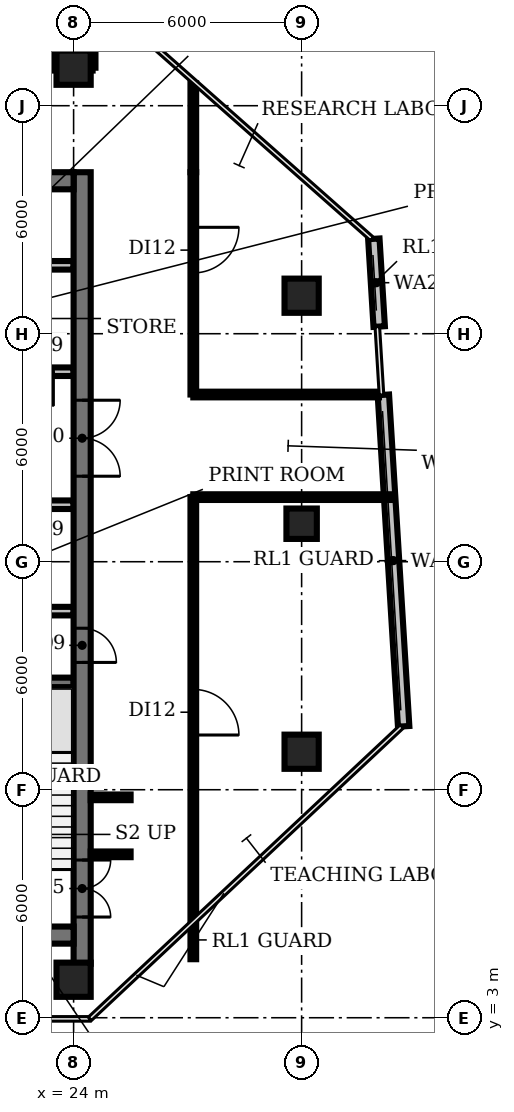
"""IFC4 building model, lengths in metres.
Left out: names, types, materials, properties, quantities, classifications, styles, units other than length and angle.
Written with IfcOpenShell. Run it as: python <this file> out.ifc"""

import sys

from ifc_helpers import new_model, si_unit, direction, frame, frame_2d, origin, origin_2d, place, context, subcontext, project, spatial, rectangle, circle, extrude, element, fill, save


model = new_model("IFC4")
c1 = context("Model", 3, precision=1e-05, world=origin(), true_north=direction((0.0, 1.0)))
c2 = subcontext(c1, "Body", "Model", "MODEL_VIEW")
j1 = project(units=[si_unit("LENGTHUNIT", "METRE"), si_unit("PLANEANGLEUNIT", "RADIAN")], contexts=[c1])
p1 = place(None, origin())
s1 = spatial("IfcSite", under=j1, at=p1, CompositionType="ELEMENT")
p2 = place(p1, origin())
s2 = spatial("IfcBuilding", under=s1, at=p2, CompositionType="ELEMENT")
p3 = place(p2, frame((0.0, 0.0, 213.8)))
s3 = spatial("IfcBuildingStorey", under=s2, at=p3, CompositionType="ELEMENT", Elevation=213.8)
for number, where, z_axis, x_axis in (
    (1, (24.0, 4.0, 0.0), (0.0, 0.0, 1.0), (1.0, 0.0, 0.0)),
    (2, (24.0, 28.0, 0.0), (0.0, 0.0, 1.0), (1.0, 0.0, 0.0)),
    (3, (30.0, 10.0, 0.0), (0.0, 0.0, 1.0), (1.0, 0.0, 0.0)),
):
    element("IfcColumn", number, at=place(p3, frame(where, z_axis=z_axis, x_axis=x_axis)), inside=s3, PredefinedType="COLUMN", context=c2, shape_type="SweptSolid", body=[
        extrude(circle(Radius=0.45, at=origin_2d()), origin(), (0.0, 0.0, 1.0), 3.85),
    ])
p4 = place(p3, frame((30.0, 16.0, 0.0), z_axis=(0.0, 0.0, 1.0), x_axis=(1.0, 0.0, 0.0)))
e4 = element("IfcColumn", 4, at=p4, inside=s3, PredefinedType="COLUMN", context=c2, shape_type="SweptSolid", body=[
    extrude(rectangle(XDim=0.8, YDim=0.8, at=origin_2d()), origin(), (0.0, 0.0, 1.0), 3.85),
])
p5 = place(p3, frame((30.0, 22.0, 0.0), z_axis=(0.0, 0.0, 1.0), x_axis=(1.0, 0.0, 0.0)))
e5 = element("IfcColumn", 5, at=p5, inside=s3, PredefinedType="COLUMN", context=c2, shape_type="SweptSolid", body=[
    extrude(circle(Radius=0.45, at=origin_2d()), origin(), (0.0, 0.0, 1.0), 3.85),
])
p6 = place(p3, frame((32.685, 10.668, 0.0), z_axis=(0.0, 0.0, 1.0), x_axis=(-0.061063491269, 0.998133883822, 0.0)))
e6 = element("IfcWall", 6, at=p6, inside=s3, PredefinedType="SOLIDWALL", context=c2, shape_type="SweptSolid", body=[
    extrude(rectangle(XDim=8.74, YDim=0.3, at=frame_2d((4.37, 0.0))), origin(), (0.0, 0.0, 1.0), 3.85),
])
p7 = place(p3, frame((32.041, 21.188, 0.0), z_axis=(0.0, 0.0, 1.0), x_axis=(-0.060998486175, 0.998137858557, 0.0)))
e7 = element("IfcWall", 7, at=p7, inside=s3, PredefinedType="SOLIDWALL", context=c2, shape_type="SweptSolid", body=[
    extrude(rectangle(XDim=2.313, YDim=0.3, at=frame_2d((1.157, 0.0))), origin(), (0.0, 0.0, 1.0), 3.85),
])
p8 = place(p3, frame((20.85, 11.825, 0.0), z_axis=(0.0, 0.0, 1.0), x_axis=(1.0, 0.0, 0.0)))
e8 = element("IfcWall", 8, at=p8, inside=s3, PredefinedType="SHEAR", context=c2, shape_type="SweptSolid", body=[
    extrude(rectangle(XDim=3.15, YDim=0.25, at=frame_2d((1.575, 0.0))), origin(), (0.0, 0.0, 1.0), 3.85),
])
p9 = place(p3, frame((16.6, 13.7, 0.0), z_axis=(0.0, 0.0, 1.0), x_axis=(1.0, 0.0, 0.0)))
e9 = element("IfcWall", 9, at=p9, inside=s3, PredefinedType="PARTITIONING", context=c2, shape_type="SweptSolid", body=[
    extrude(rectangle(XDim=7.4, YDim=0.225, at=frame_2d((3.7, 0.0))), origin(), (0.0, 0.0, 1.0), 3.85),
])
p10 = place(p3, frame((9.4, 16.5, 0.0), z_axis=(0.0, 0.0, 1.0), x_axis=(1.0, 0.0, 0.0)))
e10 = element("IfcWall", 10, at=p10, inside=s3, PredefinedType="PARTITIONING", context=c2, shape_type="SweptSolid", body=[
    extrude(rectangle(XDim=14.6, YDim=0.225, at=frame_2d((7.3, 0.0))), origin(), (0.0, 0.0, 1.0), 3.85),
])
p11 = place(p10, frame((0.55, 0.0, 0.0)))
e11 = element("IfcOpeningElement", 11, at=p11, cuts=e10, PredefinedType="OPENING", context=c2, shape_type="SweptSolid", body=[
    extrude(rectangle(XDim=0.9, YDim=2.1, at=frame_2d((0.45, 1.05))), frame((0.0, 0.123, 0.0), z_axis=(0.0, -1.0, 0.0), x_axis=(1.0, 0.0, 0.0)), (0.0, 0.0, 1.0), 0.245),
])
p12 = place(p10, frame((6.075, 0.0, 0.0)))
e12 = element("IfcOpeningElement", 12, at=p12, cuts=e10, PredefinedType="OPENING", context=c2, shape_type="SweptSolid", body=[
    extrude(rectangle(XDim=1.0, YDim=2.1, at=frame_2d((0.5, 1.05))), frame((0.0, 0.123, 0.0), z_axis=(0.0, -1.0, 0.0), x_axis=(1.0, 0.0, 0.0)), (0.0, 0.0, 1.0), 0.245),
])
p13 = place(p10, frame((11.308, 0.0, 0.0)))
e13 = element("IfcOpeningElement", 13, at=p13, cuts=e10, PredefinedType="OPENING", context=c2, shape_type="SweptSolid", body=[
    extrude(rectangle(XDim=0.9, YDim=2.1, at=frame_2d((0.45, 1.05))), frame((0.0, 0.123, 0.0), z_axis=(0.0, -1.0, 0.0), x_axis=(1.0, 0.0, 0.0)), (0.0, 0.0, 1.0), 0.245),
])
p14 = place(p10, frame((13.083, 0.0, 0.0)))
e14 = element("IfcOpeningElement", 14, at=p14, cuts=e10, PredefinedType="OPENING", context=c2, shape_type="SweptSolid", body=[
    extrude(rectangle(XDim=0.9, YDim=2.1, at=frame_2d((0.45, 1.05))), frame((0.0, 0.123, 0.0), z_axis=(0.0, -1.0, 0.0), x_axis=(1.0, 0.0, 0.0)), (0.0, 0.0, 1.0), 0.245),
])
p15 = place(p3, frame((24.0, 20.0, 0.0), z_axis=(0.0, 0.0, 1.0), x_axis=(-1.0, 0.0, 0.0)))
e15 = element("IfcWall", 15, at=p15, inside=s3, PredefinedType="PARTITIONING", context=c2, shape_type="SweptSolid", body=[
    extrude(rectangle(XDim=14.6, YDim=0.225, at=frame_2d((7.3, 0.0))), origin(), (0.0, 0.0, 1.0), 3.85),
])
p16 = place(p15, frame((12.75, 0.0, 0.0)))
e16 = element("IfcOpeningElement", 16, at=p16, cuts=e15, PredefinedType="OPENING", context=c2, shape_type="SweptSolid", body=[
    extrude(rectangle(XDim=1.1, YDim=2.1, at=frame_2d((0.55, 1.05))), frame((0.0, 0.123, 0.0), z_axis=(0.0, -1.0, 0.0), x_axis=(1.0, 0.0, 0.0)), (0.0, 0.0, 1.0), 0.245),
])
p17 = place(p15, frame((9.95, 0.0, 0.0)))
e17 = element("IfcOpeningElement", 17, at=p17, cuts=e15, PredefinedType="OPENING", context=c2, shape_type="SweptSolid", body=[
    extrude(rectangle(XDim=1.1, YDim=2.1, at=frame_2d((0.55, 1.05))), frame((0.0, 0.123, 0.0), z_axis=(0.0, -1.0, 0.0), x_axis=(1.0, 0.0, 0.0)), (0.0, 0.0, 1.0), 0.245),
])
p18 = place(p15, frame((7.15, 0.0, 0.0)))
e18 = element("IfcOpeningElement", 18, at=p18, cuts=e15, PredefinedType="OPENING", context=c2, shape_type="SweptSolid", body=[
    extrude(rectangle(XDim=1.1, YDim=2.1, at=frame_2d((0.55, 1.05))), frame((0.0, 0.123, 0.0), z_axis=(0.0, -1.0, 0.0), x_axis=(1.0, 0.0, 0.0)), (0.0, 0.0, 1.0), 0.245),
])
p19 = place(p15, frame((4.35, 0.0, 0.0)))
e19 = element("IfcOpeningElement", 19, at=p19, cuts=e15, PredefinedType="OPENING", context=c2, shape_type="SweptSolid", body=[
    extrude(rectangle(XDim=1.1, YDim=2.1, at=frame_2d((0.55, 1.05))), frame((0.0, 0.123, 0.0), z_axis=(0.0, -1.0, 0.0), x_axis=(1.0, 0.0, 0.0)), (0.0, 0.0, 1.0), 0.245),
])
p20 = place(p15, frame((2.308, 0.0, 0.0)))
e20 = element("IfcOpeningElement", 20, at=p20, cuts=e15, PredefinedType="OPENING", context=c2, shape_type="SweptSolid", body=[
    extrude(rectangle(XDim=0.9, YDim=2.1, at=frame_2d((0.45, 1.05))), frame((0.0, 0.123, 0.0), z_axis=(0.0, -1.0, 0.0), x_axis=(1.0, 0.0, 0.0)), (0.0, 0.0, 1.0), 0.245),
])
p21 = place(p15, frame((0.532, 0.0, 0.0)))
e21 = element("IfcOpeningElement", 21, at=p21, cuts=e15, PredefinedType="OPENING", context=c2, shape_type="SweptSolid", body=[
    extrude(rectangle(XDim=0.9, YDim=2.1, at=frame_2d((0.45, 1.05))), frame((0.0, 0.123, 0.0), z_axis=(0.0, -1.0, 0.0), x_axis=(1.0, 0.0, 0.0)), (0.0, 0.0, 1.0), 0.245),
])
p22 = place(p3, frame((9.4, 22.8, 0.0), z_axis=(0.0, 0.0, 1.0), x_axis=(1.0, 0.0, 0.0)))
e22 = element("IfcWall", 22, at=p22, inside=s3, PredefinedType="PARTITIONING", context=c2, shape_type="SweptSolid", body=[
    extrude(rectangle(XDim=14.6, YDim=0.225, at=frame_2d((7.3, 0.0))), origin(), (0.0, 0.0, 1.0), 3.85),
])
p23 = place(p3, frame((24.225, 25.25, 0.0), z_axis=(0.0, 0.0, 1.0), x_axis=(0.0, -1.0, 0.0)))
e23 = element("IfcWall", 23, at=p23, inside=s3, PredefinedType="SHEAR", context=c2, shape_type="SweptSolid", body=[
    extrude(rectangle(XDim=20.83, YDim=0.45, at=frame_2d((10.415, 0.0))), origin(), (0.0, 0.0, 1.0), 3.85),
])
p24 = place(p23, frame((18.1, 0.0, 0.0)))
e24 = element("IfcOpeningElement", 24, at=p24, cuts=e23, PredefinedType="OPENING", context=c2, shape_type="SweptSolid", body=[
    extrude(rectangle(XDim=1.5, YDim=2.1, at=frame_2d((0.75, 1.05))), frame((0.0, 0.235, 0.0), z_axis=(0.0, -1.0, 0.0), x_axis=(1.0, 0.0, 0.0)), (0.0, 0.0, 1.0), 0.47),
])
p25 = place(p23, frame((12.0, 0.0, 0.0)))
e25 = element("IfcOpeningElement", 25, at=p25, cuts=e23, PredefinedType="OPENING", context=c2, shape_type="SweptSolid", body=[
    extrude(rectangle(XDim=0.9, YDim=2.1, at=frame_2d((0.45, 1.05))), frame((0.0, 0.235, 0.0), z_axis=(0.0, -1.0, 0.0), x_axis=(1.0, 0.0, 0.0)), (0.0, 0.0, 1.0), 0.47),
])
p26 = place(p23, frame((6.0, 0.0, 0.0)))
e26 = element("IfcOpeningElement", 26, at=p26, cuts=e23, PredefinedType="OPENING", context=c2, shape_type="SweptSolid", body=[
    extrude(rectangle(XDim=2.0, YDim=2.1, at=frame_2d((1.0, 1.05))), frame((0.0, 0.235, 0.0), z_axis=(0.0, -1.0, 0.0), x_axis=(1.0, 0.0, 0.0)), (0.0, 0.0, 1.0), 0.47),
])
p27 = place(p3, frame((24.0, 5.175, 0.0), z_axis=(0.0, 0.0, 1.0), x_axis=(-1.0, 0.0, 0.0)))
e27 = element("IfcWall", 27, at=p27, inside=s3, PredefinedType="SHEAR", context=c2, shape_type="SweptSolid", body=[
    extrude(rectangle(XDim=18.0, YDim=0.45, at=frame_2d((9.0, 0.0))), origin(), (0.0, 0.0, 1.0), 3.85),
])
p28 = place(p27, frame((0.825, 0.0, 0.0)))
e28 = element("IfcOpeningElement", 28, at=p28, cuts=e27, PredefinedType="OPENING", context=c2, shape_type="SweptSolid", body=[
    extrude(rectangle(XDim=1.5, YDim=2.1, at=frame_2d((0.75, 1.05))), frame((0.0, 0.235, 0.0), z_axis=(0.0, -1.0, 0.0), x_axis=(1.0, 0.0, 0.0)), (0.0, 0.0, 1.0), 0.47),
])
p29 = place(p27, frame((15.675, 0.0, 0.0)))
e29 = element("IfcOpeningElement", 29, at=p29, cuts=e27, PredefinedType="OPENING", context=c2, shape_type="SweptSolid", body=[
    extrude(rectangle(XDim=1.5, YDim=2.1, at=frame_2d((0.75, 1.05))), frame((0.0, 0.235, 0.0), z_axis=(0.0, -1.0, 0.0), x_axis=(1.0, 0.0, 0.0)), (0.0, 0.0, 1.0), 0.47),
])
p30 = place(p27, frame((13.0, 0.0, 0.0)))
e30 = element("IfcOpeningElement", 30, at=p30, cuts=e27, PredefinedType="OPENING", context=c2, shape_type="SweptSolid", body=[
    extrude(rectangle(XDim=1.2, YDim=2.1, at=frame_2d((0.6, 1.05))), frame((0.0, 0.235, 0.0), z_axis=(0.0, -1.0, 0.0), x_axis=(1.0, 0.0, 0.0)), (0.0, 0.0, 1.0), 0.47),
])
p31 = place(p27, frame((4.4, 0.0, 0.0)))
e31 = element("IfcOpeningElement", 31, at=p31, cuts=e27, PredefinedType="OPENING", context=c2, shape_type="SweptSolid", body=[
    extrude(rectangle(XDim=1.0, YDim=2.1, at=frame_2d((0.5, 1.05))), frame((0.0, 0.235, 0.0), z_axis=(0.0, -1.0, 0.0), x_axis=(1.0, 0.0, 0.0)), (0.0, 0.0, 1.0), 0.47),
])
p32 = place(p3, frame((6.0, 25.025, 0.0), z_axis=(0.0, 0.0, 1.0), x_axis=(1.0, 0.0, 0.0)))
e32 = element("IfcWall", 32, at=p32, inside=s3, PredefinedType="SHEAR", context=c2, shape_type="SweptSolid", body=[
    extrude(rectangle(XDim=18.0, YDim=0.45, at=frame_2d((9.0, 0.0))), origin(), (0.0, 0.0, 1.0), 3.85),
])
p33 = place(p3, frame((23.5, 28.0, 0.0), z_axis=(0.0, 0.0, 1.0), x_axis=(0.0, 1.0, 0.0)))
e33 = element("IfcWall", 33, at=p33, inside=s3, PredefinedType="PARTITIONING", context=c2, shape_type="SweptSolid", body=[
    extrude(rectangle(XDim=1.15, YDim=0.15, at=frame_2d((0.575, 0.0))), origin(), (0.0, 0.0, 1.0), 2.88),
])
p34 = place(p3, frame((23.5, 28.0, 0.0), z_axis=(0.0, 0.0, 1.0), x_axis=(1.0, 0.0, 0.0)))
e34 = element("IfcWall", 34, at=p34, inside=s3, PredefinedType="PARTITIONING", context=c2, shape_type="SweptSolid", body=[
    extrude(rectangle(XDim=1.0, YDim=0.15, at=frame_2d((0.5, 0.0))), origin(), (0.0, 0.0, 1.0), 2.88),
])
for number, where, z_axis, x_axis in (
    (35, (24.45, 7.3, 0.0), (0.0, 0.0, 1.0), (1.0, 0.0, 0.0)),
    (36, (24.45, 8.8, 0.0), (0.0, 0.0, 1.0), (1.0, 0.0, 0.0)),
):
    element("IfcWall", number, at=place(p3, frame(where, z_axis=z_axis, x_axis=x_axis)), inside=s3, PredefinedType="PARTITIONING", context=c2, shape_type="SweptSolid", body=[
        extrude(rectangle(XDim=1.05, YDim=0.15, at=frame_2d((0.525, 0.0))), origin(), (0.0, 0.0, 1.0), 2.88),
    ])
p35 = place(p3, frame((24.5, 28.0, 0.0), z_axis=(0.0, 0.0, 1.0), x_axis=(0.0, 1.0, 0.0)))
e37 = element("IfcWall", 37, at=p35, inside=s3, PredefinedType="PARTITIONING", context=c2, shape_type="SweptSolid", body=[
    extrude(rectangle(XDim=1.15, YDim=0.15, at=frame_2d((0.575, 0.0))), origin(), (0.0, 0.0, 1.0), 2.88),
])
p36 = place(p3, frame((27.15, 16.7, 0.0), z_axis=(0.0, 0.0, 1.0), x_axis=(0.0, -1.0, 0.0)))
e38 = element("IfcWall", 38, at=p36, inside=s3, PredefinedType="PARTITIONING", context=c2, shape_type="SweptSolid", body=[
    extrude(rectangle(XDim=12.16, YDim=0.15, at=frame_2d((6.08, 0.0))), origin(), (0.0, 0.0, 1.0), 2.88),
])
p37 = place(p36, frame((5.06, 0.0, 0.0)))
e39 = element("IfcOpeningElement", 39, at=p37, cuts=e38, PredefinedType="OPENING", context=c2, shape_type="SweptSolid", body=[
    extrude(rectangle(XDim=1.2, YDim=2.1, at=frame_2d((0.6, 1.05))), frame((0.0, 0.085, 0.0), z_axis=(0.0, -1.0, 0.0), x_axis=(1.0, 0.0, 0.0)), (0.0, 0.0, 1.0), 0.17),
])
p38 = place(p3, frame((27.15, 16.7, 0.0), z_axis=(0.0, 0.0, 1.0), x_axis=(1.0, 0.0, 0.0)))
e40 = element("IfcWall", 40, at=p38, inside=s3, PredefinedType="PARTITIONING", context=c2, shape_type="SweptSolid", body=[
    extrude(rectangle(XDim=5.176, YDim=0.15, at=frame_2d((2.588, 0.0))), origin(), (0.0, 0.0, 1.0), 2.88),
])
p39 = place(p3, frame((27.15, 19.4, 0.0), z_axis=(0.0, 0.0, 1.0), x_axis=(1.0, 0.0, 0.0)))
e41 = element("IfcWall", 41, at=p39, inside=s3, PredefinedType="PARTITIONING", context=c2, shape_type="SweptSolid", body=[
    extrude(rectangle(XDim=4.885, YDim=0.15, at=frame_2d((2.442, 0.0))), origin(), (0.0, 0.0, 1.0), 2.88),
])
p40 = place(p3, frame((27.15, 25.25, 0.0), z_axis=(0.0, 0.0, 1.0), x_axis=(0.0, -1.0, 0.0)))
e42 = element("IfcWall", 42, at=p40, inside=s3, PredefinedType="PARTITIONING", context=c2, shape_type="SweptSolid", body=[
    extrude(rectangle(XDim=5.85, YDim=0.15, at=frame_2d((2.925, 0.0))), origin(), (0.0, 0.0, 1.0), 2.88),
])
p41 = place(p40, frame((1.45, 0.0, 0.0)))
e43 = element("IfcOpeningElement", 43, at=p41, cuts=e42, PredefinedType="OPENING", context=c2, shape_type="SweptSolid", body=[
    extrude(rectangle(XDim=1.2, YDim=2.1, at=frame_2d((0.6, 1.05))), frame((0.0, 0.085, 0.0), z_axis=(0.0, -1.0, 0.0), x_axis=(1.0, 0.0, 0.0)), (0.0, 0.0, 1.0), 0.17),
])
p42 = place(p3, frame((27.15, 25.25, 0.0), z_axis=(0.0, 0.0, 1.0), x_axis=(0.0, 1.0, 0.0)))
e44 = element("IfcWall", 44, at=p42, inside=s3, PredefinedType="PARTITIONING", context=c2, shape_type="SweptSolid", body=[
    extrude(rectangle(XDim=2.34, YDim=0.15, at=frame_2d((1.17, 0.0))), origin(), (0.0, 0.0, 1.0), 2.88),
])
p43 = place(p21, origin())
e45 = element("IfcDoor", 45, at=p43, inside=s3, OperationType="SINGLE_SWING_LEFT", PredefinedType="DOOR", context=c2, shape_type="SweptSolid", body=[
    extrude(rectangle(XDim=0.9, YDim=2.1, at=frame_2d((0.45, 1.05))), frame((0.0, 0.025, 0.0), z_axis=(0.0, -1.0, 0.0), x_axis=(1.0, 0.0, 0.0)), (0.0, 0.0, 1.0), 0.05),
])
fill(e21, e45)
p44 = place(p24, origin())
e46 = element("IfcDoor", 46, at=p44, inside=s3, OperationType="DOUBLE_DOOR_SINGLE_SWING", PredefinedType="DOOR", context=c2, shape_type="SweptSolid", body=[
    extrude(rectangle(XDim=1.5, YDim=2.1, at=frame_2d((0.75, 1.05))), frame((0.0, 0.025, 0.0), z_axis=(0.0, -1.0, 0.0), x_axis=(1.0, 0.0, 0.0)), (0.0, 0.0, 1.0), 0.05),
])
fill(e24, e46)
p45 = place(p25, origin())
e47 = element("IfcDoor", 47, at=p45, inside=s3, OperationType="SINGLE_SWING_RIGHT", PredefinedType="DOOR", context=c2, shape_type="SweptSolid", body=[
    extrude(rectangle(XDim=0.9, YDim=2.1, at=frame_2d((0.45, 1.05))), frame((0.0, 0.025, 0.0), z_axis=(0.0, -1.0, 0.0), x_axis=(1.0, 0.0, 0.0)), (0.0, 0.0, 1.0), 0.05),
])
fill(e25, e47)
p46 = place(p26, origin())
e48 = element("IfcDoor", 48, at=p46, inside=s3, OperationType="DOUBLE_DOOR_SINGLE_SWING", PredefinedType="DOOR", context=c2, shape_type="SweptSolid", body=[
    extrude(rectangle(XDim=2.0, YDim=2.1, at=frame_2d((1.0, 1.05))), frame((0.0, 0.025, 0.0), z_axis=(0.0, -1.0, 0.0), x_axis=(1.0, 0.0, 0.0)), (0.0, 0.0, 1.0), 0.05),
])
fill(e26, e48)
p47 = place(p37, origin())
e49 = element("IfcDoor", 49, at=p47, inside=s3, OperationType="SINGLE_SWING_RIGHT", PredefinedType="DOOR", context=c2, shape_type="SweptSolid", body=[
    extrude(rectangle(XDim=1.2, YDim=2.1, at=frame_2d((0.6, 1.05))), frame((0.0, 0.025, 0.0), z_axis=(0.0, -1.0, 0.0), x_axis=(1.0, 0.0, 0.0)), (0.0, 0.0, 1.0), 0.05),
])
fill(e39, e49)
p48 = place(p41, origin())
e50 = element("IfcDoor", 50, at=p48, inside=s3, OperationType="SINGLE_SWING_LEFT", PredefinedType="DOOR", context=c2, shape_type="SweptSolid", body=[
    extrude(rectangle(XDim=1.2, YDim=2.1, at=frame_2d((0.6, 1.05))), frame((0.0, 0.025, 0.0), z_axis=(0.0, -1.0, 0.0), x_axis=(1.0, 0.0, 0.0)), (0.0, 0.0, 1.0), 0.05),
])
fill(e43, e50)
save(model, sys.argv[1])
